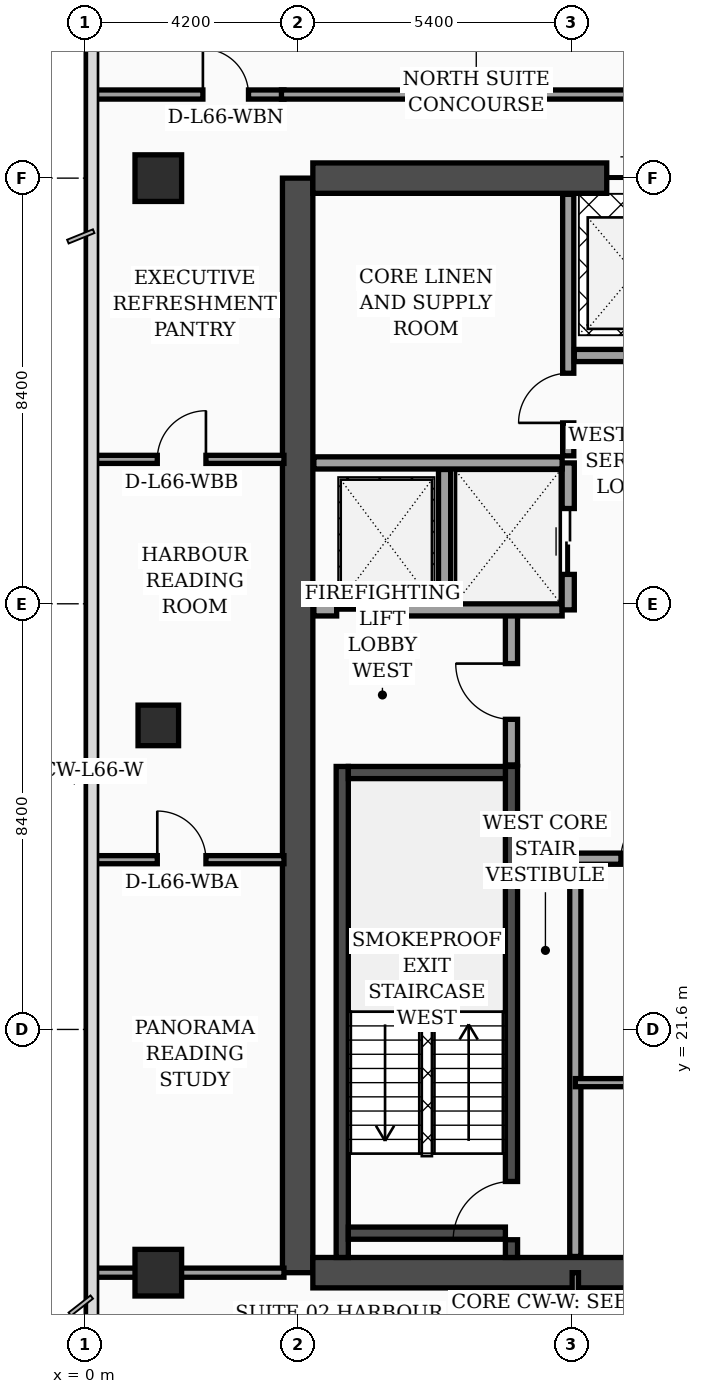
"""IFC4 building model, lengths in metres.
Left out: names, types, materials, properties, quantities, classifications, styles, units other than length and angle.
Written with IfcOpenShell. Run it as: python <this file> out.ifc"""

import sys

from ifc_helpers import new_model, si_unit, direction, frame, frame_2d, origin, origin_2d, place, context, subcontext, project, spatial, rectangle, extrude, element, fill, save


model = new_model("IFC4")
c1 = context("Model", 3, precision=1e-05, world=origin(), true_north=direction((0.0, 1.0)))
c2 = subcontext(c1, "Body", "Model", "MODEL_VIEW")
j1 = project(units=[si_unit("LENGTHUNIT", "METRE"), si_unit("PLANEANGLEUNIT", "RADIAN")], contexts=[c1])
p1 = place(None, origin())
s1 = spatial("IfcSite", under=j1, at=p1, CompositionType="ELEMENT")
p2 = place(p1, origin())
s2 = spatial("IfcBuilding", under=s1, at=p2, CompositionType="ELEMENT")
p3 = place(p2, frame((0.0, 0.0, 267.3)))
s3 = spatial("IfcBuildingStorey", under=s2, at=p3, CompositionType="ELEMENT", Elevation=267.3)
p4 = place(p3, frame((4.2, 16.8, 0.0), z_axis=(0.0, 0.0, 1.0), x_axis=(0.0, 1.0, 0.0)))
e1 = element("IfcWall", 1, at=p4, inside=s3, PredefinedType="SHEAR", context=c2, shape_type="SweptSolid", body=[
    extrude(rectangle(XDim=21.6, YDim=0.6, at=frame_2d((10.8, 0.0))), origin(), (0.0, 0.0, 1.0), 3.56),
])
p5 = place(p3, frame((4.5, 38.4, 0.0), z_axis=(0.0, 0.0, 1.0), x_axis=(1.0, 0.0, 0.0)))
e2 = element("IfcWall", 2, at=p5, inside=s3, PredefinedType="SHEAR", context=c2, shape_type="SweptSolid", body=[
    extrude(rectangle(XDim=10.2, YDim=0.6, at=frame_2d((5.1, 0.0))), origin(), (0.0, 0.0, 1.0), 3.56),
])
p6 = place(p5, frame((5.8, 0.0, 0.0)))
e3 = element("IfcOpeningElement", 3, at=p6, cuts=e2, PredefinedType="OPENING", context=c2, shape_type="SweptSolid", body=[
    extrude(rectangle(XDim=1.1, YDim=2.2, at=frame_2d((0.55, 1.1))), frame((0.0, 0.31, 0.0), z_axis=(0.0, -1.0, 0.0), x_axis=(1.0, 0.0, 0.0)), (0.0, 0.0, 1.0), 0.62),
])
p7 = place(p3, frame((4.5, 16.8, 0.0), z_axis=(0.0, 0.0, 1.0), x_axis=(1.0, 0.0, 0.0)))
e4 = element("IfcWall", 4, at=p7, inside=s3, PredefinedType="SHEAR", context=c2, shape_type="SweptSolid", body=[
    extrude(rectangle(XDim=10.2, YDim=0.6, at=frame_2d((5.1, 0.0))), origin(), (0.0, 0.0, 1.0), 3.56),
])
p8 = place(p3, frame((5.08, 17.1, 0.0), z_axis=(0.0, 0.0, 1.0), x_axis=(0.0, 1.0, 0.0)))
e5 = element("IfcWall", 5, at=p8, inside=s3, PredefinedType="SOLIDWALL", context=c2, shape_type="SweptSolid", body=[
    extrude(rectangle(XDim=9.69, YDim=0.24, at=frame_2d((4.845, 0.0))), origin(), (0.0, 0.0, 1.0), 3.56),
])
p9 = place(p3, frame((8.42, 17.1, 0.0), z_axis=(0.0, 0.0, 1.0), x_axis=(0.0, 1.0, 0.0)))
e6 = element("IfcWall", 6, at=p9, inside=s3, PredefinedType="SOLIDWALL", context=c2, shape_type="SweptSolid", body=[
    extrude(rectangle(XDim=9.69, YDim=0.24, at=frame_2d((4.845, 0.0))), origin(), (0.0, 0.0, 1.0), 3.56),
])
p10 = place(p9, frame((0.35, 0.0, 0.0)))
e7 = element("IfcOpeningElement", 7, at=p10, cuts=e6, PredefinedType="OPENING", context=c2, shape_type="SweptSolid", body=[
    extrude(rectangle(XDim=1.15, YDim=2.2, at=frame_2d((0.575, 1.1))), frame((0.0, 0.13, 0.0), z_axis=(0.0, -1.0, 0.0), x_axis=(1.0, 0.0, 0.0)), (0.0, 0.0, 1.0), 0.26),
])
for number, where, z_axis, x_axis in (
    (8, (5.2, 17.58, 0.0), (0.0, 0.0, 1.0), (1.0, 0.0, 0.0)),
    (9, (5.2, 26.67, 0.0), (0.0, 0.0, 1.0), (1.0, 0.0, 0.0)),
):
    element("IfcWall", number, at=place(p3, frame(where, z_axis=z_axis, x_axis=x_axis)), inside=s3, PredefinedType="SOLIDWALL", context=c2, shape_type="SweptSolid", body=[
        extrude(rectangle(XDim=3.1, YDim=0.24, at=frame_2d((1.55, 0.0))), origin(), (0.0, 0.0, 1.0), 3.56),
    ])
p11 = place(p3, frame((1.45, 16.8, 0.0), z_axis=(0.0, 0.0, 1.0), x_axis=(1.0, 0.0, 0.0)))
e10 = element("IfcColumn", 10, at=p11, inside=s3, PredefinedType="COLUMN", context=c2, shape_type="SweptSolid", body=[
    extrude(rectangle(XDim=0.92, YDim=0.92, at=origin_2d()), origin(), (0.0, 0.0, 1.0), 3.56),
])
p12 = place(p3, frame((1.45, 27.6, 0.0), z_axis=(0.0, 0.0, 1.0), x_axis=(1.0, 0.0, 0.0)))
e11 = element("IfcColumn", 11, at=p12, inside=s3, PredefinedType="COLUMN", context=c2, shape_type="SweptSolid", body=[
    extrude(rectangle(XDim=0.8, YDim=0.8, at=origin_2d()), origin(), (0.0, 0.0, 1.0), 3.56),
])
p13 = place(p3, frame((1.45, 38.4, 0.0), z_axis=(0.0, 0.0, 1.0), x_axis=(1.0, 0.0, 0.0)))
e12 = element("IfcColumn", 12, at=p13, inside=s3, PredefinedType="COLUMN", context=c2, shape_type="SweptSolid", body=[
    extrude(rectangle(XDim=0.92, YDim=0.92, at=origin_2d()), origin(), (0.0, 0.0, 1.0), 3.56),
])
p14 = place(p3, frame((8.42, 26.82, 0.0), z_axis=(0.0, 0.0, 1.0), x_axis=(0.0, 1.0, 0.0)))
e13 = element("IfcWall", 13, at=p14, inside=s3, PredefinedType="SOLIDWALL", context=c2, shape_type="SweptSolid", body=[
    extrude(rectangle(XDim=3.0, YDim=0.24, at=frame_2d((1.5, 0.0))), origin(), (0.0, 0.0, 1.0), 3.56),
])
p15 = place(p14, frame((0.9, 0.0, 0.0)))
e14 = element("IfcOpeningElement", 14, at=p15, cuts=e13, PredefinedType="OPENING", context=c2, shape_type="SweptSolid", body=[
    extrude(rectangle(XDim=1.1, YDim=2.2, at=frame_2d((0.55, 1.1))), frame((0.0, 0.13, 0.0), z_axis=(0.0, -1.0, 0.0), x_axis=(1.0, 0.0, 0.0)), (0.0, 0.0, 1.0), 0.26),
])
p16 = place(p3, frame((4.52, 29.88, 0.0), z_axis=(0.0, 0.0, 1.0), x_axis=(1.0, 0.0, 0.0)))
e15 = element("IfcWall", 15, at=p16, inside=s3, PredefinedType="SOLIDWALL", context=c2, shape_type="SweptSolid", body=[
    extrude(rectangle(XDim=4.9, YDim=0.24, at=frame_2d((2.45, 0.0))), origin(), (0.0, 0.0, 1.0), 3.56),
])
p17 = place(p16, frame((0.45, 0.0, 0.0)))
e16 = element("IfcOpeningElement", 16, at=p17, cuts=e15, PredefinedType="OPENING", context=c2, shape_type="SweptSolid", body=[
    extrude(rectangle(XDim=1.3, YDim=2.35, at=frame_2d((0.65, 1.175))), frame((0.0, 0.13, 0.0), z_axis=(0.0, -1.0, 0.0), x_axis=(1.0, 0.0, 0.0)), (0.0, 0.0, 1.0), 0.26),
])
p18 = place(p3, frame((7.1, 30.02, 0.0), z_axis=(0.0, 0.0, 1.0), x_axis=(0.0, 1.0, 0.0)))
e17 = element("IfcWall", 17, at=p18, inside=s3, PredefinedType="SOLIDWALL", context=c2, shape_type="SweptSolid", body=[
    extrude(rectangle(XDim=2.63, YDim=0.24, at=frame_2d((1.315, 0.0))), origin(), (0.0, 0.0, 1.0), 3.56),
])
p19 = place(p3, frame((9.54, 29.88, 0.0), z_axis=(0.0, 0.0, 1.0), x_axis=(0.0, 1.0, 0.0)))
e18 = element("IfcWall", 18, at=p19, inside=s3, PredefinedType="SOLIDWALL", context=c2, shape_type="SweptSolid", body=[
    extrude(rectangle(XDim=2.9, YDim=0.24, at=frame_2d((1.45, 0.0))), origin(), (0.0, 0.0, 1.0), 3.56),
])
p20 = place(p19, frame((0.7, 0.0, 0.0)))
e19 = element("IfcOpeningElement", 19, at=p20, cuts=e18, PredefinedType="OPENING", context=c2, shape_type="SweptSolid", body=[
    extrude(rectangle(XDim=1.3, YDim=2.35, at=frame_2d((0.65, 1.175))), frame((0.0, 0.13, 0.0), z_axis=(0.0, -1.0, 0.0), x_axis=(1.0, 0.0, 0.0)), (0.0, 0.0, 1.0), 0.26),
])
p21 = place(p3, frame((4.52, 32.78, 0.0), z_axis=(0.0, 0.0, 1.0), x_axis=(1.0, 0.0, 0.0)))
e20 = element("IfcWall", 20, at=p21, inside=s3, PredefinedType="SOLIDWALL", context=c2, shape_type="SweptSolid", body=[
    extrude(rectangle(XDim=4.9, YDim=0.24, at=frame_2d((2.45, 0.0))), origin(), (0.0, 0.0, 1.0), 3.19),
])
p22 = place(p3, frame((9.68, 17.12, 0.0), z_axis=(0.0, 0.0, 1.0), x_axis=(0.0, 1.0, 0.0)))
e21 = element("IfcWall", 21, at=p22, inside=s3, PredefinedType="SOLIDWALL", context=c2, shape_type="SweptSolid", body=[
    extrude(rectangle(XDim=7.88, YDim=0.22, at=frame_2d((3.94, 0.0))), origin(), (0.0, 0.0, 1.0), 3.56),
])
p23 = place(p3, frame((9.54, 32.92, 0.0), z_axis=(0.0, 0.0, 1.0), x_axis=(0.0, 1.0, 0.0)))
e22 = element("IfcWall", 22, at=p23, inside=s3, PredefinedType="SOLIDWALL", context=c2, shape_type="SweptSolid", body=[
    extrude(rectangle(XDim=5.16, YDim=0.22, at=frame_2d((2.58, 0.0))), origin(), (0.0, 0.0, 1.0), 3.56),
])
p24 = place(p23, frame((0.65, 0.0, 0.0)))
e23 = element("IfcOpeningElement", 23, at=p24, cuts=e22, PredefinedType="OPENING", context=c2, shape_type="SweptSolid", body=[
    extrude(rectangle(XDim=0.98, YDim=2.15, at=frame_2d((0.49, 1.075))), frame((0.0, 0.12, 0.0), z_axis=(0.0, -1.0, 0.0), x_axis=(1.0, 0.0, 0.0)), (0.0, 0.0, 1.0), 0.24),
])
p25 = place(p3, frame((9.68, 20.55, 0.0), z_axis=(0.0, 0.0, 1.0), x_axis=(1.0, 0.0, 0.0)))
e24 = element("IfcWall", 24, at=p25, inside=s3, PredefinedType="PARTITIONING", context=c2, shape_type="SweptSolid", body=[
    extrude(rectangle(XDim=5.0, YDim=0.16, at=frame_2d((2.5, 0.0))), origin(), (0.0, 0.0, 1.0), 3.56),
])
p26 = place(p25, frame((1.1, 0.0, 0.0)))
e25 = element("IfcOpeningElement", 25, at=p26, cuts=e24, PredefinedType="OPENING", context=c2, shape_type="SweptSolid", body=[
    extrude(rectangle(XDim=0.98, YDim=2.15, at=frame_2d((0.49, 1.075))), frame((0.0, 0.09, 0.0), z_axis=(0.0, -1.0, 0.0), x_axis=(1.0, 0.0, 0.0)), (0.0, 0.0, 1.0), 0.18),
])
p27 = place(p3, frame((9.68, 24.97, 0.0), z_axis=(0.0, 0.0, 1.0), x_axis=(1.0, 0.0, 0.0)))
e26 = element("IfcWall", 26, at=p27, inside=s3, PredefinedType="SOLIDWALL", context=c2, shape_type="SweptSolid", body=[
    extrude(rectangle(XDim=5.0, YDim=0.22, at=frame_2d((2.5, 0.0))), origin(), (0.0, 0.0, 1.0), 2.99),
])
p28 = place(p27, frame((0.9, 0.0, 0.0)))
e27 = element("IfcOpeningElement", 27, at=p28, cuts=e26, PredefinedType="OPENING", context=c2, shape_type="SweptSolid", body=[
    extrude(rectangle(XDim=0.98, YDim=2.15, at=frame_2d((0.49, 1.075))), frame((0.0, 0.12, 0.0), z_axis=(0.0, -1.0, 0.0), x_axis=(1.0, 0.0, 0.0)), (0.0, 0.0, 1.0), 0.24),
])
p29 = place(p3, frame((9.66, 34.9, 0.0), z_axis=(0.0, 0.0, 1.0), x_axis=(1.0, 0.0, 0.0)))
e28 = element("IfcWall", 28, at=p29, inside=s3, PredefinedType="SOLIDWALL", context=c2, shape_type="SweptSolid", body=[
    extrude(rectangle(XDim=5.02, YDim=0.24, at=frame_2d((2.51, 0.0))), origin(), (0.0, 0.0, 1.0), 3.56),
])
p30 = place(p3, frame((0.08, 24.95, 0.0), z_axis=(0.0, 0.0, 1.0), x_axis=(1.0, 0.0, 0.0)))
e29 = element("IfcWall", 29, at=p30, inside=s3, PredefinedType="PARTITIONING", context=c2, shape_type="SweptSolid", body=[
    extrude(rectangle(XDim=3.85, YDim=0.16, at=frame_2d((1.925, 0.0))), origin(), (0.0, 0.0, 1.0), 3.09),
])
p31 = place(p30, frame((1.35, 0.0, 0.0)))
e30 = element("IfcOpeningElement", 30, at=p31, cuts=e29, PredefinedType="OPENING", context=c2, shape_type="SweptSolid", body=[
    extrude(rectangle(XDim=0.96, YDim=2.2, at=frame_2d((0.48, 1.1))), frame((0.0, 0.09, 0.0), z_axis=(0.0, -1.0, 0.0), x_axis=(1.0, 0.0, 0.0)), (0.0, 0.0, 1.0), 0.18),
])
p32 = place(p3, frame((0.08, 32.85, 0.0), z_axis=(0.0, 0.0, 1.0), x_axis=(1.0, 0.0, 0.0)))
e31 = element("IfcWall", 31, at=p32, inside=s3, PredefinedType="PARTITIONING", context=c2, shape_type="SweptSolid", body=[
    extrude(rectangle(XDim=3.85, YDim=0.16, at=frame_2d((1.925, 0.0))), origin(), (0.0, 0.0, 1.0), 3.09),
])
p33 = place(p32, frame((1.35, 0.0, 0.0)))
e32 = element("IfcOpeningElement", 32, at=p33, cuts=e31, PredefinedType="OPENING", context=c2, shape_type="SweptSolid", body=[
    extrude(rectangle(XDim=0.96, YDim=2.2, at=frame_2d((0.48, 1.1))), frame((0.0, 0.09, 0.0), z_axis=(0.0, -1.0, 0.0), x_axis=(1.0, 0.0, 0.0)), (0.0, 0.0, 1.0), 0.18),
])
p34 = place(p3, frame((0.08, 16.8, 0.0), z_axis=(0.0, 0.0, 1.0), x_axis=(1.0, 0.0, 0.0)))
e33 = element("IfcWall", 33, at=p34, inside=s3, PredefinedType="PARTITIONING", context=c2, shape_type="SweptSolid", body=[
    extrude(rectangle(XDim=3.85, YDim=0.18, at=frame_2d((1.925, 0.0))), origin(), (0.0, 0.0, 1.0), 2.99),
])
p35 = place(p3, frame((0.08, 40.05, 0.0), z_axis=(0.0, 0.0, 1.0), x_axis=(1.0, 0.0, 0.0)))
e34 = element("IfcWall", 34, at=p35, inside=s3, PredefinedType="PARTITIONING", context=c2, shape_type="SweptSolid", body=[
    extrude(rectangle(XDim=3.85, YDim=0.18, at=frame_2d((1.925, 0.0))), origin(), (0.0, 0.0, 1.0), 2.99),
])
p36 = place(p35, frame((2.25, 0.0, 0.0)))
e35 = element("IfcOpeningElement", 35, at=p36, cuts=e34, PredefinedType="OPENING", context=c2, shape_type="SweptSolid", body=[
    extrude(rectangle(XDim=0.9, YDim=2.15, at=frame_2d((0.45, 1.075))), frame((0.0, 0.1, 0.0), z_axis=(0.0, -1.0, 0.0), x_axis=(1.0, 0.0, 0.0)), (0.0, 0.0, 1.0), 0.2),
])
p37 = place(p3, frame((9.68, 14.67, 0.0), z_axis=(0.0, 0.0, 1.0), x_axis=(0.0, 1.0, 0.0)))
e36 = element("IfcWall", 36, at=p37, inside=s3, PredefinedType="PARTITIONING", context=c2, shape_type="SweptSolid", body=[
    extrude(rectangle(XDim=2.13, YDim=0.125, at=frame_2d((1.065, 0.0))), origin(), (0.0, 0.0, 1.0), 3.56),
])
p38 = place(p3, frame((3.88, 40.05, 0.0), z_axis=(0.0, 0.0, 1.0), x_axis=(1.0, 0.0, 0.0)))
e37 = element("IfcWall", 37, at=p38, inside=s3, PredefinedType="PARTITIONING", context=c2, shape_type="SweptSolid", body=[
    extrude(rectangle(XDim=11.27, YDim=0.18, at=frame_2d((5.635, 0.0))), origin(), (0.0, 0.0, 1.0), 2.99),
])
p39 = place(p15, origin())
e38 = element("IfcDoor", 38, at=p39, inside=s3, OperationType="SINGLE_SWING_RIGHT", PredefinedType="DOOR", context=c2, shape_type="SweptSolid", body=[
    extrude(rectangle(XDim=1.1, YDim=2.2, at=frame_2d((0.55, 1.1))), frame((0.0, 0.025, 0.0), z_axis=(0.0, -1.0, 0.0), x_axis=(1.0, 0.0, 0.0)), (0.0, 0.0, 1.0), 0.05),
])
fill(e14, e38)
p40 = place(p17, origin())
e39 = element("IfcDoor", 39, at=p40, inside=s3, OperationType="DOUBLE_DOOR_SLIDING", PredefinedType="DOOR", context=c2, shape_type="SweptSolid", body=[
    extrude(rectangle(XDim=1.3, YDim=2.35, at=frame_2d((0.65, 1.175))), frame((0.0, 0.025, 0.0), z_axis=(0.0, -1.0, 0.0), x_axis=(1.0, 0.0, 0.0)), (0.0, 0.0, 1.0), 0.05),
])
fill(e16, e39)
p41 = place(p20, origin())
e40 = element("IfcDoor", 40, at=p41, inside=s3, OperationType="DOUBLE_DOOR_SLIDING", PredefinedType="DOOR", context=c2, shape_type="SweptSolid", body=[
    extrude(rectangle(XDim=1.3, YDim=2.35, at=frame_2d((0.65, 1.175))), frame((0.0, 0.025, 0.0), z_axis=(0.0, -1.0, 0.0), x_axis=(1.0, 0.0, 0.0)), (0.0, 0.0, 1.0), 0.05),
])
fill(e19, e40)
p42 = place(p24, origin())
e41 = element("IfcDoor", 41, at=p42, inside=s3, OperationType="SINGLE_SWING_LEFT", PredefinedType="DOOR", context=c2, shape_type="SweptSolid", body=[
    extrude(rectangle(XDim=0.98, YDim=2.15, at=frame_2d((0.49, 1.075))), frame((0.0, 0.025, 0.0), z_axis=(0.0, -1.0, 0.0), x_axis=(1.0, 0.0, 0.0)), (0.0, 0.0, 1.0), 0.05),
])
fill(e23, e41)
p43 = place(p28, origin())
e42 = element("IfcDoor", 42, at=p43, inside=s3, OperationType="SINGLE_SWING_RIGHT", PredefinedType="DOOR", context=c2, shape_type="SweptSolid", body=[
    extrude(rectangle(XDim=0.98, YDim=2.15, at=frame_2d((0.49, 1.075))), frame((0.0, 0.025, 0.0), z_axis=(0.0, -1.0, 0.0), x_axis=(1.0, 0.0, 0.0)), (0.0, 0.0, 1.0), 0.05),
])
fill(e27, e42)
p44 = place(p31, origin())
e43 = element("IfcDoor", 43, at=p44, inside=s3, OperationType="SINGLE_SWING_LEFT", PredefinedType="DOOR", context=c2, shape_type="SweptSolid", body=[
    extrude(rectangle(XDim=0.96, YDim=2.2, at=frame_2d((0.48, 1.1))), frame((0.0, 0.025, 0.0), z_axis=(0.0, -1.0, 0.0), x_axis=(1.0, 0.0, 0.0)), (0.0, 0.0, 1.0), 0.05),
])
fill(e30, e43)
p45 = place(p33, origin())
e44 = element("IfcDoor", 44, at=p45, inside=s3, OperationType="SINGLE_SWING_RIGHT", PredefinedType="DOOR", context=c2, shape_type="SweptSolid", body=[
    extrude(rectangle(XDim=0.96, YDim=2.2, at=frame_2d((0.48, 1.1))), frame((0.0, 0.025, 0.0), z_axis=(0.0, -1.0, 0.0), x_axis=(1.0, 0.0, 0.0)), (0.0, 0.0, 1.0), 0.05),
])
fill(e32, e44)
p46 = place(p36, origin())
e45 = element("IfcDoor", 45, at=p46, inside=s3, OperationType="SINGLE_SWING_LEFT", PredefinedType="DOOR", context=c2, shape_type="SweptSolid", body=[
    extrude(rectangle(XDim=0.9, YDim=2.15, at=frame_2d((0.45, 1.075))), frame((0.0, 0.025, 0.0), z_axis=(0.0, -1.0, 0.0), x_axis=(1.0, 0.0, 0.0)), (0.0, 0.0, 1.0), 0.05),
])
fill(e35, e45)
p47 = place(p10, origin())
e46 = element("IfcDoor", 46, at=p47, inside=s3, OperationType="SINGLE_SWING_LEFT", PredefinedType="DOOR", context=c2, shape_type="SweptSolid", body=[
    extrude(rectangle(XDim=1.15, YDim=2.2, at=frame_2d((0.575, 1.1))), frame((0.0, 0.025, 0.0), z_axis=(0.0, -1.0, 0.0), x_axis=(1.0, 0.0, 0.0)), (0.0, 0.0, 1.0), 0.05),
])
fill(e7, e46)
p48 = place(p6, origin())
e47 = element("IfcDoor", 47, at=p48, inside=s3, OperationType="DOUBLE_DOOR_SLIDING", PredefinedType="DOOR", context=c2, shape_type="SweptSolid", body=[
    extrude(rectangle(XDim=1.1, YDim=2.2, at=frame_2d((0.55, 1.1))), frame((0.0, 0.025, 0.0), z_axis=(0.0, -1.0, 0.0), x_axis=(1.0, 0.0, 0.0)), (0.0, 0.0, 1.0), 0.05),
])
fill(e3, e47)
save(model, sys.argv[1])
